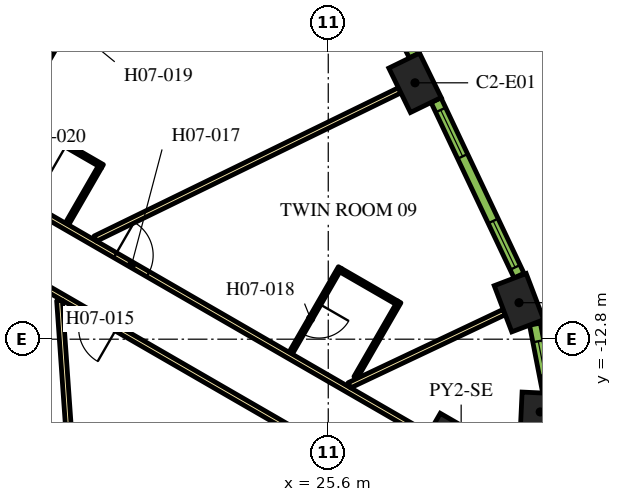
"""IFC4 building model, lengths in metres.
Left out: names, types, materials, properties, quantities, classifications, styles, units other than length and angle.
Written with IfcOpenShell. Run it as: python <this file> out.ifc"""

import sys

from ifc_helpers import new_model, si_unit, direction, frame, frame_2d, origin, origin_2d, place, context, subcontext, project, spatial, rectangle, extrude, element, fill, save


model = new_model("IFC4")
c1 = context("Model", 3, precision=1e-05, world=origin(), true_north=direction((0.0, 1.0)))
c2 = subcontext(c1, "Body", "Model", "MODEL_VIEW")
j1 = project(units=[si_unit("LENGTHUNIT", "METRE"), si_unit("PLANEANGLEUNIT", "RADIAN")], contexts=[c1])
p1 = place(None, origin())
s1 = spatial("IfcSite", under=j1, at=p1, CompositionType="ELEMENT")
p2 = place(p1, origin())
s2 = spatial("IfcBuilding", under=s1, at=p2, CompositionType="ELEMENT")
p3 = place(p2, frame((0.0, 0.0, 95.4)))
s3 = spatial("IfcBuildingStorey", under=s2, at=p3, CompositionType="ELEMENT", Elevation=95.4)
p4 = place(p3, frame((29.097, -16.799, 0.0), z_axis=(0.0, 0.0, 1.0), x_axis=(0.866025403784, -0.5, 0.0)))
e1 = element("IfcColumn", 1, at=p4, inside=s3, PredefinedType="COLUMN", context=c2, shape_type="SweptSolid", body=[
    extrude(rectangle(XDim=3.0, YDim=3.0, at=origin_2d()), origin(), (0.0, 0.0, 1.0), 3.9),
])
p5 = place(p3, frame((31.177, -14.714, 0.0), z_axis=(0.0, 0.0, 1.0), x_axis=(0.046756026083, 0.998906338965, 0.0)))
e2 = element("IfcColumn", 2, at=p5, inside=s3, PredefinedType="COLUMN", context=c2, shape_type="SweptSolid", body=[
    extrude(rectangle(XDim=1.0, YDim=1.0, at=origin_2d()), origin(), (0.0, 0.0, 1.0), 3.9),
])
for number, where, z_axis, x_axis in (
    (3, (30.619, -11.839, 0.0), (0.0, 0.0, 1.0), (-0.355, 0.935, 0.0)),
    (4, (27.883, -6.054, 0.0), (0.0, 0.0, 1.0), (-0.438, 0.899, 0.0)),
):
    element("IfcColumn", number, at=place(p3, frame(where, z_axis=z_axis, x_axis=x_axis)), inside=s3, PredefinedType="COLUMN", context=c2, shape_type="SweptSolid", body=[
        extrude(rectangle(XDim=1.3, YDim=0.9, at=origin_2d()), origin(), (0.0, 0.0, 1.0), 3.9),
    ])
p6 = place(p3, frame((16.412, -8.523, 0.0), z_axis=(0.0, 0.0, 1.0), x_axis=(0.866025629663, -0.499999608766, 0.0)))
e5 = element("IfcWall", 5, at=p6, inside=s3, PredefinedType="PARTITIONING", context=c2, shape_type="SweptSolid", body=[
    extrude(rectangle(XDim=13.624, YDim=0.15, at=frame_2d((6.812, 0.0))), origin(), (0.0, 0.0, 1.0), 2.75),
])
p7 = place(p6, frame((4.134, 0.0, 0.0)))
e6 = element("IfcOpeningElement", 6, at=p7, cuts=e5, PredefinedType="OPENING", context=c2, shape_type="SweptSolid", body=[
    extrude(rectangle(XDim=1.0, YDim=2.1, at=frame_2d((0.5, 1.05))), frame((0.0, 0.085, 0.0), z_axis=(0.0, -1.0, 0.0), x_axis=(1.0, 0.0, 0.0)), (0.0, 0.0, 1.0), 0.17),
])
p8 = place(p3, frame((19.081, -3.9, 0.0), z_axis=(0.0, 0.0, 1.0), x_axis=(-0.499974327079, -0.866040225545, 0.0)))
e7 = element("IfcWall", 7, at=p8, inside=s3, PredefinedType="PARTITIONING", context=c2, shape_type="SweptSolid", body=[
    extrude(rectangle(XDim=5.258, YDim=0.15, at=frame_2d((2.629, 0.0))), origin(), (0.0, 0.0, 1.0), 2.75),
])
p9 = place(p8, frame((0.18, 0.0, 0.0)))
e8 = element("IfcOpeningElement", 8, at=p9, cuts=e7, PredefinedType="OPENING", context=c2, shape_type="SweptSolid", body=[
    extrude(rectangle(XDim=1.0, YDim=2.1, at=frame_2d((0.5, 1.05))), frame((0.0, 0.085, 0.0), z_axis=(0.0, -1.0, 0.0), x_axis=(1.0, 0.0, 0.0)), (0.0, 0.0, 1.0), 0.17),
])
p10 = place(p3, frame((27.386, -16.764, 0.0), z_axis=(0.0, 0.0, 1.0), x_axis=(-0.866022585856, 0.500004880763, 0.0)))
e9 = element("IfcWall", 9, at=p10, inside=s3, PredefinedType="PARTITIONING", context=c2, shape_type="SweptSolid", body=[
    extrude(rectangle(XDim=13.544, YDim=0.15, at=frame_2d((6.772, 0.0))), origin(), (0.0, 0.0, 1.0), 2.75),
])
p11 = place(p10, frame((8.491, 0.0, 0.0)))
e10 = element("IfcOpeningElement", 10, at=p11, cuts=e9, PredefinedType="OPENING", context=c2, shape_type="SweptSolid", body=[
    extrude(rectangle(XDim=1.0, YDim=2.1, at=frame_2d((0.5, 1.05))), frame((0.0, 0.085, 0.0), z_axis=(0.0, -1.0, 0.0), x_axis=(1.0, 0.0, 0.0)), (0.0, 0.0, 1.0), 0.17),
])
p12 = place(p3, frame((19.153, -20.671, 0.0), z_axis=(0.0, 0.0, 1.0), x_axis=(-0.070070736723, 0.997542025107, 0.0)))
e11 = element("IfcWall", 11, at=p12, inside=s3, PredefinedType="PARTITIONING", context=c2, shape_type="SweptSolid", body=[
    extrude(rectangle(XDim=8.909, YDim=0.15, at=frame_2d((4.455, 0.0))), origin(), (0.0, 0.0, 1.0), 2.75),
])
p13 = place(p3, frame((27.479, -6.251, 0.0), z_axis=(0.0, 0.0, 1.0), x_axis=(-0.898945877276, -0.438059710231, 0.0)))
e12 = element("IfcWall", 12, at=p13, inside=s3, PredefinedType="PARTITIONING", context=c2, shape_type="SweptSolid", body=[
    extrude(rectangle(XDim=8.909, YDim=0.15, at=frame_2d((4.455, 0.0))), origin(), (0.0, 0.0, 1.0), 2.75),
])
p14 = place(p3, frame((30.231, -12.085, 0.0), z_axis=(0.0, 0.0, 1.0), x_axis=(-0.904001132572, -0.427530060122, 0.0)))
e13 = element("IfcWall", 13, at=p14, inside=s3, PredefinedType="PARTITIONING", context=c2, shape_type="SweptSolid", body=[
    extrude(rectangle(XDim=4.51, YDim=0.15, at=frame_2d((2.255, 0.0))), origin(), (0.0, 0.0, 1.0), 2.75),
])
p15 = place(p3, frame((25.91, -10.918, 0.0), z_axis=(0.0, 0.0, 1.0), x_axis=(-0.500006934395, -0.866021400173, 0.0)))
e14 = element("IfcWall", 14, at=p15, inside=s3, PredefinedType="PARTITIONING", context=c2, shape_type="SweptSolid", body=[
    extrude(rectangle(XDim=2.6, YDim=0.1, at=frame_2d((1.3, 0.0))), origin(), (0.0, 0.0, 1.0), 2.75),
])
p16 = place(p15, frame((1.1, 0.0, 0.0)))
e15 = element("IfcOpeningElement", 15, at=p16, cuts=e14, PredefinedType="OPENING", context=c2, shape_type="SweptSolid", body=[
    extrude(rectangle(XDim=0.9, YDim=2.1, at=frame_2d((0.45, 1.05))), frame((0.0, 0.06, 0.0), z_axis=(0.0, -1.0, 0.0), x_axis=(1.0, 0.0, 0.0)), (0.0, 0.0, 1.0), 0.12),
])
p17 = place(p3, frame((25.928, -10.986, 0.0), z_axis=(0.0, 0.0, 1.0), x_axis=(0.866025371046, -0.500000056704, 0.0)))
e16 = element("IfcWall", 16, at=p17, inside=s3, PredefinedType="PARTITIONING", context=c2, shape_type="SweptSolid", body=[
    extrude(rectangle(XDim=1.7, YDim=0.1, at=frame_2d((0.85, 0.0))), origin(), (0.0, 0.0, 1.0), 2.75),
])
p18 = place(p3, frame((26.319, -13.81, 0.0), z_axis=(0.0, 0.0, 1.0), x_axis=(0.499952165731, 0.866053019151, 0.0)))
e17 = element("IfcWall", 17, at=p18, inside=s3, PredefinedType="PARTITIONING", context=c2, shape_type="SweptSolid", body=[
    extrude(rectangle(XDim=2.3, YDim=0.1, at=frame_2d((1.15, 0.0))), origin(), (0.0, 0.0, 1.0), 2.75),
])
p19 = place(p3, frame((19.659, -8.25, 0.0), z_axis=(0.0, 0.0, 1.0), x_axis=(-0.866021400173, 0.500006934395, 0.0)))
e18 = element("IfcWall", 18, at=p19, inside=s3, PredefinedType="PARTITIONING", context=c2, shape_type="SweptSolid", body=[
    extrude(rectangle(XDim=2.6, YDim=0.1, at=frame_2d((1.3, 0.0))), origin(), (0.0, 0.0, 1.0), 2.75),
])
p20 = place(p19, frame((1.1, 0.0, 0.0)))
e19 = element("IfcOpeningElement", 19, at=p20, cuts=e18, PredefinedType="OPENING", context=c2, shape_type="SweptSolid", body=[
    extrude(rectangle(XDim=0.9, YDim=2.1, at=frame_2d((0.45, 1.05))), frame((0.0, 0.06, 0.0), z_axis=(0.0, -1.0, 0.0), x_axis=(1.0, 0.0, 0.0)), (0.0, 0.0, 1.0), 0.12),
])
p21 = place(p3, frame((19.591, -8.268, 0.0), z_axis=(0.0, 0.0, 1.0), x_axis=(-0.500040090343, -0.866002256377, 0.0)))
e20 = element("IfcWall", 20, at=p21, inside=s3, PredefinedType="PARTITIONING", context=c2, shape_type="SweptSolid", body=[
    extrude(rectangle(XDim=1.73, YDim=0.1, at=frame_2d((0.865, 0.0))), origin(), (0.0, 0.0, 1.0), 2.75),
])
p22 = place(p3, frame((31.385, -14.189, 0.0), z_axis=(0.0, 0.0, 1.0), x_axis=(-0.190409913989, 0.981704672829, 0.0)))
e21 = element("IfcWall", 21, at=p22, inside=s3, PredefinedType="SOLIDWALL", context=c2, shape_type="SweptSolid", body=[
    extrude(rectangle(XDim=1.819, YDim=0.29, at=frame_2d((0.91, 0.0))), origin(), (0.0, 0.0, 1.0), 3.65),
])
p23 = place(p22, frame((0.46, 0.0, 0.9)))
e22 = element("IfcOpeningElement", 22, at=p23, cuts=e21, PredefinedType="OPENING", context=c2, shape_type="SweptSolid", body=[
    extrude(rectangle(XDim=0.9, YDim=2.15, at=frame_2d((0.45, 1.075))), frame((0.0, 0.155, 0.0), z_axis=(0.0, -1.0, 0.0), x_axis=(1.0, 0.0, 0.0)), (0.0, 0.0, 1.0), 0.31),
])
p24 = place(p3, frame((30.62, -11.127, 0.0), z_axis=(0.0, 0.0, 1.0), x_axis=(-0.427543726596, 0.903994669148, 0.0)))
e23 = element("IfcWall", 23, at=p24, inside=s3, PredefinedType="SOLIDWALL", context=c2, shape_type="SweptSolid", body=[
    extrude(rectangle(XDim=5.107, YDim=0.29, at=frame_2d((2.553, 0.0))), origin(), (0.0, 0.0, 1.0), 3.65),
])
p25 = place(p24, frame((0.24, 0.0, 0.9)))
e24 = element("IfcOpeningElement", 24, at=p25, cuts=e23, PredefinedType="OPENING", context=c2, shape_type="SweptSolid", body=[
    extrude(rectangle(XDim=1.35, YDim=2.15, at=frame_2d((0.675, 1.075))), frame((0.0, 0.155, 0.0), z_axis=(0.0, -1.0, 0.0), x_axis=(1.0, 0.0, 0.0)), (0.0, 0.0, 1.0), 0.31),
])
p26 = place(p24, frame((3.471, 0.0, 0.9)))
e25 = element("IfcOpeningElement", 25, at=p26, cuts=e23, PredefinedType="OPENING", context=c2, shape_type="SweptSolid", body=[
    extrude(rectangle(XDim=1.35, YDim=2.15, at=frame_2d((0.675, 1.075))), frame((0.0, 0.155, 0.0), z_axis=(0.0, -1.0, 0.0), x_axis=(1.0, 0.0, 0.0)), (0.0, 0.0, 1.0), 0.31),
])
p27 = place(p3, frame((27.864, -5.336, 0.0), z_axis=(0.0, 0.0, 1.0), x_axis=(-0.448534297211, 0.893765620409, 0.0)))
e26 = element("IfcWall", 26, at=p27, inside=s3, PredefinedType="SOLIDWALL", context=c2, shape_type="SweptSolid", body=[
    extrude(rectangle(XDim=5.1, YDim=0.29, at=frame_2d((2.55, 0.0))), origin(), (0.0, 0.0, 1.0), 3.65),
])
p28 = place(p27, frame((0.272, 0.0, 0.9)))
e27 = element("IfcOpeningElement", 27, at=p28, cuts=e26, PredefinedType="OPENING", context=c2, shape_type="SweptSolid", body=[
    extrude(rectangle(XDim=1.35, YDim=2.15, at=frame_2d((0.675, 1.075))), frame((0.0, 0.155, 0.0), z_axis=(0.0, -1.0, 0.0), x_axis=(1.0, 0.0, 0.0)), (0.0, 0.0, 1.0), 0.31),
])
p29 = place(p27, frame((3.478, 0.0, 0.9)))
e28 = element("IfcOpeningElement", 28, at=p29, cuts=e26, PredefinedType="OPENING", context=c2, shape_type="SweptSolid", body=[
    extrude(rectangle(XDim=1.35, YDim=2.15, at=frame_2d((0.675, 1.075))), frame((0.0, 0.155, 0.0), z_axis=(0.0, -1.0, 0.0), x_axis=(1.0, 0.0, 0.0)), (0.0, 0.0, 1.0), 0.31),
])
p30 = place(p11, origin())
e29 = element("IfcDoor", 29, at=p30, inside=s3, OperationType="SINGLE_SWING_RIGHT", PredefinedType="DOOR", context=c2, shape_type="SweptSolid", body=[
    extrude(rectangle(XDim=1.0, YDim=2.1, at=frame_2d((0.5, 1.05))), frame((0.0, 0.025, 0.0), z_axis=(0.0, -1.0, 0.0), x_axis=(1.0, 0.0, 0.0)), (0.0, 0.0, 1.0), 0.05),
])
fill(e10, e29)
p31 = place(p7, origin())
e30 = element("IfcDoor", 30, at=p31, inside=s3, OperationType="SINGLE_SWING_LEFT", PredefinedType="DOOR", context=c2, shape_type="SweptSolid", body=[
    extrude(rectangle(XDim=1.0, YDim=2.1, at=frame_2d((0.5, 1.05))), frame((0.0, 0.025, 0.0), z_axis=(0.0, -1.0, 0.0), x_axis=(1.0, 0.0, 0.0)), (0.0, 0.0, 1.0), 0.05),
])
fill(e6, e30)
p32 = place(p16, origin())
e31 = element("IfcDoor", 31, at=p32, inside=s3, OperationType="SINGLE_SWING_RIGHT", PredefinedType="DOOR", context=c2, shape_type="SweptSolid", body=[
    extrude(rectangle(XDim=0.9, YDim=2.1, at=frame_2d((0.45, 1.05))), frame((0.0, 0.025, 0.0), z_axis=(0.0, -1.0, 0.0), x_axis=(1.0, 0.0, 0.0)), (0.0, 0.0, 1.0), 0.05),
])
fill(e15, e31)
p33 = place(p20, origin())
e32 = element("IfcDoor", 32, at=p33, inside=s3, OperationType="SINGLE_SWING_LEFT", PredefinedType="DOOR", context=c2, shape_type="SweptSolid", body=[
    extrude(rectangle(XDim=0.9, YDim=2.1, at=frame_2d((0.45, 1.05))), frame((0.0, 0.025, 0.0), z_axis=(0.0, -1.0, 0.0), x_axis=(1.0, 0.0, 0.0)), (0.0, 0.0, 1.0), 0.05),
])
fill(e19, e32)
p34 = place(p23, origin())
e33 = element("IfcWindow", 33, at=p34, inside=s3, PartitioningType="SINGLE_PANEL", PredefinedType="WINDOW", context=c2, shape_type="SweptSolid", body=[
    extrude(rectangle(XDim=0.9, YDim=2.15, at=frame_2d((0.45, 1.075))), frame((0.0, 0.015, 0.0), z_axis=(0.0, -1.0, 0.0), x_axis=(1.0, 0.0, 0.0)), (0.0, 0.0, 1.0), 0.06),
])
fill(e22, e33)
p35 = place(p25, origin())
e34 = element("IfcWindow", 34, at=p35, inside=s3, PartitioningType="DOUBLE_PANEL_VERTICAL", PredefinedType="WINDOW", context=c2, shape_type="SweptSolid", body=[
    extrude(rectangle(XDim=1.35, YDim=2.15, at=frame_2d((0.675, 1.075))), frame((0.0, 0.015, 0.0), z_axis=(0.0, -1.0, 0.0), x_axis=(1.0, 0.0, 0.0)), (0.0, 0.0, 1.0), 0.06),
])
fill(e24, e34)
p36 = place(p26, origin())
e35 = element("IfcWindow", 35, at=p36, inside=s3, PartitioningType="DOUBLE_PANEL_VERTICAL", PredefinedType="WINDOW", context=c2, shape_type="SweptSolid", body=[
    extrude(rectangle(XDim=1.35, YDim=2.15, at=frame_2d((0.675, 1.075))), frame((0.0, 0.015, 0.0), z_axis=(0.0, -1.0, 0.0), x_axis=(1.0, 0.0, 0.0)), (0.0, 0.0, 1.0), 0.06),
])
fill(e25, e35)
save(model, sys.argv[1])
